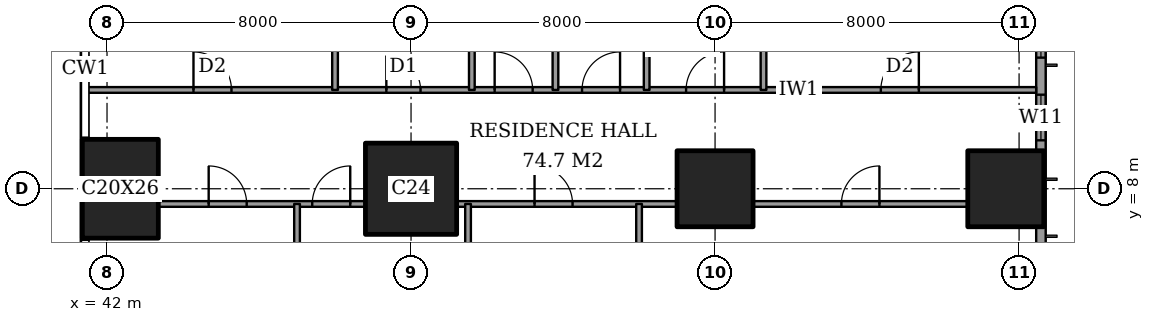
"""IFC4 building model, lengths in metres.
Left out: names, types, materials, properties, quantities, classifications, styles, units other than length and angle.
Written with IfcOpenShell. Run it as: python <this file> out.ifc"""

import sys

from ifc_helpers import new_model, si_unit, direction, frame, frame_2d, origin, origin_2d, place, context, subcontext, project, spatial, rectangle, extrude, element, fill, save


model = new_model("IFC4")
c1 = context("Model", 3, precision=1e-05, world=origin(), true_north=direction((0.0, 1.0)))
c2 = subcontext(c1, "Body", "Model", "MODEL_VIEW")
j1 = project(units=[si_unit("LENGTHUNIT", "METRE"), si_unit("PLANEANGLEUNIT", "RADIAN")], contexts=[c1])
p1 = place(None, origin())
s1 = spatial("IfcSite", under=j1, at=p1, CompositionType="ELEMENT")
p2 = place(p1, origin())
s2 = spatial("IfcBuilding", under=s1, at=p2, CompositionType="ELEMENT")
p3 = place(p2, frame((0.0, 0.0, 114.2)))
s3 = spatial("IfcBuildingStorey", under=s2, at=p3, CompositionType="ELEMENT", Elevation=114.2)
p4 = place(p3, frame((42.35, 8.0, 0.0), z_axis=(0.0, 0.0, 1.0), x_axis=(1.0, 0.0, 0.0)))
e1 = element("IfcColumn", 1, at=p4, inside=s3, PredefinedType="COLUMN", context=c2, shape_type="SweptSolid", body=[
    extrude(rectangle(XDim=2.0, YDim=2.6, at=origin_2d()), origin(), (0.0, 0.0, 1.0), 3.6),
])
p5 = place(p3, frame((50.0, 8.0, 0.0), z_axis=(0.0, 0.0, 1.0), x_axis=(1.0, 0.0, 0.0)))
e2 = element("IfcColumn", 2, at=p5, inside=s3, PredefinedType="COLUMN", context=c2, shape_type="SweptSolid", body=[
    extrude(rectangle(XDim=2.4, YDim=2.4, at=origin_2d()), origin(), (0.0, 0.0, 1.0), 3.6),
])
for number, where, z_axis, x_axis in (
    (3, (58.0, 8.0, 0.0), (0.0, 0.0, 1.0), (1.0, 0.0, 0.0)),
    (4, (65.65, 8.0, 0.0), (0.0, 0.0, 1.0), (1.0, 0.0, 0.0)),
):
    element("IfcColumn", number, at=place(p3, frame(where, z_axis=z_axis, x_axis=x_axis)), inside=s3, PredefinedType="COLUMN", context=c2, shape_type="SweptSolid", body=[
        extrude(rectangle(XDim=2.0, YDim=2.0, at=origin_2d()), origin(), (0.0, 0.0, 1.0), 3.6),
    ])
p6 = place(p3, frame((66.575, 3.175, 0.0), z_axis=(0.0, 0.0, 1.0), x_axis=(0.0, 1.0, 0.0)))
e5 = element("IfcWall", 5, at=p6, inside=s3, PredefinedType="SOLIDWALL", context=c2, shape_type="SweptSolid", body=[
    extrude(rectangle(XDim=41.65, YDim=0.25, at=frame_2d((20.825, 0.0))), origin(), (0.0, 0.0, 1.0), 3.6),
])
p7 = place(p6, frame((0.775, 0.0, 0.4)))
e6 = element("IfcOpeningElement", 6, at=p7, cuts=e5, PredefinedType="OPENING", context=c2, shape_type="SweptSolid", body=[
    extrude(rectangle(XDim=2.4, YDim=2.2, at=frame_2d((1.2, 1.1))), frame((0.0, 0.135, 0.0), z_axis=(0.0, -1.0, 0.0), x_axis=(1.0, 0.0, 0.0)), (0.0, 0.0, 1.0), 0.27),
])
p8 = place(p6, frame((6.1, 0.0, 0.4)))
e7 = element("IfcOpeningElement", 7, at=p8, cuts=e5, PredefinedType="OPENING", context=c2, shape_type="SweptSolid", body=[
    extrude(rectangle(XDim=1.2, YDim=2.2, at=frame_2d((0.6, 1.1))), frame((0.0, 0.135, 0.0), z_axis=(0.0, -1.0, 0.0), x_axis=(1.0, 0.0, 0.0)), (0.0, 0.0, 1.0), 0.27),
])
p9 = place(p6, frame((8.275, 0.0, 0.4)))
e8 = element("IfcOpeningElement", 8, at=p9, cuts=e5, PredefinedType="OPENING", context=c2, shape_type="SweptSolid", body=[
    extrude(rectangle(XDim=2.4, YDim=2.2, at=frame_2d((1.2, 1.1))), frame((0.0, 0.135, 0.0), z_axis=(0.0, -1.0, 0.0), x_axis=(1.0, 0.0, 0.0)), (0.0, 0.0, 1.0), 0.27),
])
p10 = place(p6, frame((15.775, 0.0, 0.4)))
e9 = element("IfcOpeningElement", 9, at=p10, cuts=e5, PredefinedType="OPENING", context=c2, shape_type="SweptSolid", body=[
    extrude(rectangle(XDim=2.4, YDim=2.2, at=frame_2d((1.2, 1.1))), frame((0.0, 0.135, 0.0), z_axis=(0.0, -1.0, 0.0), x_axis=(1.0, 0.0, 0.0)), (0.0, 0.0, 1.0), 0.27),
])
p11 = place(p6, frame((23.475, 0.0, 0.4)))
e10 = element("IfcOpeningElement", 10, at=p11, cuts=e5, PredefinedType="OPENING", context=c2, shape_type="SweptSolid", body=[
    extrude(rectangle(XDim=2.4, YDim=2.2, at=frame_2d((1.2, 1.1))), frame((0.0, 0.135, 0.0), z_axis=(0.0, -1.0, 0.0), x_axis=(1.0, 0.0, 0.0)), (0.0, 0.0, 1.0), 0.27),
])
p12 = place(p6, frame((30.975, 0.0, 0.4)))
e11 = element("IfcOpeningElement", 11, at=p12, cuts=e5, PredefinedType="OPENING", context=c2, shape_type="SweptSolid", body=[
    extrude(rectangle(XDim=2.4, YDim=2.2, at=frame_2d((1.2, 1.1))), frame((0.0, 0.135, 0.0), z_axis=(0.0, -1.0, 0.0), x_axis=(1.0, 0.0, 0.0)), (0.0, 0.0, 1.0), 0.27),
])
p13 = place(p6, frame((34.5, 0.0, 0.4)))
e12 = element("IfcOpeningElement", 12, at=p13, cuts=e5, PredefinedType="OPENING", context=c2, shape_type="SweptSolid", body=[
    extrude(rectangle(XDim=1.2, YDim=2.2, at=frame_2d((0.6, 1.1))), frame((0.0, 0.135, 0.0), z_axis=(0.0, -1.0, 0.0), x_axis=(1.0, 0.0, 0.0)), (0.0, 0.0, 1.0), 0.27),
])
p14 = place(p6, frame((38.475, 0.0, 0.4)))
e13 = element("IfcOpeningElement", 13, at=p14, cuts=e5, PredefinedType="OPENING", context=c2, shape_type="SweptSolid", body=[
    extrude(rectangle(XDim=2.4, YDim=2.2, at=frame_2d((1.2, 1.1))), frame((0.0, 0.135, 0.0), z_axis=(0.0, -1.0, 0.0), x_axis=(1.0, 0.0, 0.0)), (0.0, 0.0, 1.0), 0.27),
])
p15 = place(p3, frame((43.35, 7.6, 0.0), z_axis=(0.0, 0.0, 1.0), x_axis=(1.0, 0.0, 0.0)))
e14 = element("IfcWall", 14, at=p15, inside=s3, PredefinedType="PARTITIONING", context=c2, shape_type="SweptSolid", body=[
    extrude(rectangle(XDim=5.45, YDim=0.15, at=frame_2d((2.725, 0.0))), origin(), (0.0, 0.0, 1.0), 3.35),
])
p16 = place(p15, frame((4.05, 0.0, 0.0)))
e15 = element("IfcOpeningElement", 15, at=p16, cuts=e14, PredefinedType="OPENING", context=c2, shape_type="SweptSolid", body=[
    extrude(rectangle(XDim=1.0, YDim=2.1, at=frame_2d((0.5, 1.05))), frame((0.0, 0.085, 0.0), z_axis=(0.0, -1.0, 0.0), x_axis=(1.0, 0.0, 0.0)), (0.0, 0.0, 1.0), 0.17),
])
p17 = place(p15, frame((1.325, 0.0, 0.0)))
e16 = element("IfcOpeningElement", 16, at=p17, cuts=e14, PredefinedType="OPENING", context=c2, shape_type="SweptSolid", body=[
    extrude(rectangle(XDim=1.0, YDim=2.1, at=frame_2d((0.5, 1.05))), frame((0.0, 0.085, 0.0), z_axis=(0.0, -1.0, 0.0), x_axis=(1.0, 0.0, 0.0)), (0.0, 0.0, 1.0), 0.17),
])
p18 = place(p3, frame((51.2, 7.6, 0.0), z_axis=(0.0, 0.0, 1.0), x_axis=(1.0, 0.0, 0.0)))
e17 = element("IfcWall", 17, at=p18, inside=s3, PredefinedType="PARTITIONING", context=c2, shape_type="SweptSolid", body=[
    extrude(rectangle(XDim=5.8, YDim=0.15, at=frame_2d((2.9, 0.0))), origin(), (0.0, 0.0, 1.0), 3.35),
])
p19 = place(p18, frame((2.05, 0.0, 0.0)))
e18 = element("IfcOpeningElement", 18, at=p19, cuts=e17, PredefinedType="OPENING", context=c2, shape_type="SweptSolid", body=[
    extrude(rectangle(XDim=1.0, YDim=2.1, at=frame_2d((0.5, 1.05))), frame((0.0, 0.085, 0.0), z_axis=(0.0, -1.0, 0.0), x_axis=(1.0, 0.0, 0.0)), (0.0, 0.0, 1.0), 0.17),
])
p20 = place(p3, frame((59.0, 7.6, 0.0), z_axis=(0.0, 0.0, 1.0), x_axis=(1.0, 0.0, 0.0)))
e19 = element("IfcWall", 19, at=p20, inside=s3, PredefinedType="PARTITIONING", context=c2, shape_type="SweptSolid", body=[
    extrude(rectangle(XDim=5.65, YDim=0.15, at=frame_2d((2.825, 0.0))), origin(), (0.0, 0.0, 1.0), 3.35),
])
p21 = place(p20, frame((2.325, 0.0, 0.0)))
e20 = element("IfcOpeningElement", 20, at=p21, cuts=e19, PredefinedType="OPENING", context=c2, shape_type="SweptSolid", body=[
    extrude(rectangle(XDim=1.0, YDim=2.1, at=frame_2d((0.5, 1.05))), frame((0.0, 0.085, 0.0), z_axis=(0.0, -1.0, 0.0), x_axis=(1.0, 0.0, 0.0)), (0.0, 0.0, 1.0), 0.17),
])
p22 = place(p3, frame((41.439, 10.6, 0.0), z_axis=(0.0, 0.0, 1.0), x_axis=(1.0, 0.0, 0.0)))
e21 = element("IfcWall", 21, at=p22, inside=s3, PredefinedType="PARTITIONING", context=c2, shape_type="SweptSolid", body=[
    extrude(rectangle(XDim=25.011, YDim=0.15, at=frame_2d((12.505, 0.0))), origin(), (0.0, 0.0, 1.0), 3.35),
])
p23 = place(p22, frame((10.761, 0.0, 0.0)))
e22 = element("IfcOpeningElement", 22, at=p23, cuts=e21, PredefinedType="OPENING", context=c2, shape_type="SweptSolid", body=[
    extrude(rectangle(XDim=1.0, YDim=2.1, at=frame_2d((0.5, 1.05))), frame((0.0, 0.085, 0.0), z_axis=(0.0, -1.0, 0.0), x_axis=(1.0, 0.0, 0.0)), (0.0, 0.0, 1.0), 0.17),
])
p24 = place(p22, frame((20.924, 0.0, 0.0)))
e23 = element("IfcOpeningElement", 23, at=p24, cuts=e21, PredefinedType="OPENING", context=c2, shape_type="SweptSolid", body=[
    extrude(rectangle(XDim=1.0, YDim=2.1, at=frame_2d((0.5, 1.05))), frame((0.0, 0.085, 0.0), z_axis=(0.0, -1.0, 0.0), x_axis=(1.0, 0.0, 0.0)), (0.0, 0.0, 1.0), 0.17),
])
p25 = place(p22, frame((15.799, 0.0, 0.0)))
e24 = element("IfcOpeningElement", 24, at=p25, cuts=e21, PredefinedType="OPENING", context=c2, shape_type="SweptSolid", body=[
    extrude(rectangle(XDim=1.0, YDim=2.1, at=frame_2d((0.5, 1.05))), frame((0.0, 0.085, 0.0), z_axis=(0.0, -1.0, 0.0), x_axis=(1.0, 0.0, 0.0)), (0.0, 0.0, 1.0), 0.17),
])
p26 = place(p22, frame((13.061, 0.0, 0.0)))
e25 = element("IfcOpeningElement", 25, at=p26, cuts=e21, PredefinedType="OPENING", context=c2, shape_type="SweptSolid", body=[
    extrude(rectangle(XDim=1.0, YDim=2.1, at=frame_2d((0.5, 1.05))), frame((0.0, 0.085, 0.0), z_axis=(0.0, -1.0, 0.0), x_axis=(1.0, 0.0, 0.0)), (0.0, 0.0, 1.0), 0.17),
])
p27 = place(p22, frame((7.911, 0.0, 0.0)))
e26 = element("IfcOpeningElement", 26, at=p27, cuts=e21, PredefinedType="OPENING", context=c2, shape_type="SweptSolid", body=[
    extrude(rectangle(XDim=0.9, YDim=2.1, at=frame_2d((0.45, 1.05))), frame((0.0, 0.085, 0.0), z_axis=(0.0, -1.0, 0.0), x_axis=(1.0, 0.0, 0.0)), (0.0, 0.0, 1.0), 0.17),
])
p28 = place(p22, frame((2.836, 0.0, 0.0)))
e27 = element("IfcOpeningElement", 27, at=p28, cuts=e21, PredefinedType="OPENING", context=c2, shape_type="SweptSolid", body=[
    extrude(rectangle(XDim=1.0, YDim=2.1, at=frame_2d((0.5, 1.05))), frame((0.0, 0.085, 0.0), z_axis=(0.0, -1.0, 0.0), x_axis=(1.0, 0.0, 0.0)), (0.0, 0.0, 1.0), 0.17),
])
p29 = place(p3, frame((47.0, -0.45, 0.0), z_axis=(0.0, 0.0, 1.0), x_axis=(0.0, 1.0, 0.0)))
e28 = element("IfcWall", 28, at=p29, inside=s3, PredefinedType="PARTITIONING", context=c2, shape_type="SweptSolid", body=[
    extrude(rectangle(XDim=8.05, YDim=0.15, at=frame_2d((4.025, 0.0))), origin(), (0.0, 0.0, 1.0), 3.35),
])
p30 = place(p3, frame((48.0, 10.6, 0.0), z_axis=(0.0, 0.0, 1.0), x_axis=(0.0, 1.0, 0.0)))
e29 = element("IfcWall", 29, at=p30, inside=s3, PredefinedType="PARTITIONING", context=c2, shape_type="SweptSolid", body=[
    extrude(rectangle(XDim=13.4, YDim=0.15, at=frame_2d((6.7, 0.0))), origin(), (0.0, 0.0, 1.0), 3.35),
])
p31 = place(p30, frame((10.8, 0.0, 0.0)))
e30 = element("IfcOpeningElement", 30, at=p31, cuts=e29, PredefinedType="OPENING", context=c2, shape_type="SweptSolid", body=[
    extrude(rectangle(XDim=1.2, YDim=2.4, at=frame_2d((0.6, 1.2))), frame((0.0, 0.085, 0.0), z_axis=(0.0, -1.0, 0.0), x_axis=(1.0, 0.0, 0.0)), (0.0, 0.0, 1.0), 0.17),
])
p32 = place(p30, frame((6.7, 0.0, 0.0)))
e31 = element("IfcOpeningElement", 31, at=p32, cuts=e29, PredefinedType="OPENING", context=c2, shape_type="SweptSolid", body=[
    extrude(rectangle(XDim=0.9, YDim=2.1, at=frame_2d((0.45, 1.05))), frame((0.0, 0.085, 0.0), z_axis=(0.0, -1.0, 0.0), x_axis=(1.0, 0.0, 0.0)), (0.0, 0.0, 1.0), 0.17),
])
p33 = place(p3, frame((51.5, -0.45, 0.0), z_axis=(0.0, 0.0, 1.0), x_axis=(0.0, 1.0, 0.0)))
e32 = element("IfcWall", 32, at=p33, inside=s3, PredefinedType="PARTITIONING", context=c2, shape_type="SweptSolid", body=[
    extrude(rectangle(XDim=8.05, YDim=0.15, at=frame_2d((4.025, 0.0))), origin(), (0.0, 0.0, 1.0), 3.35),
])
for number, where, z_axis, x_axis in (
    (33, (51.6, 10.6, 0.0), (0.0, 0.0, 1.0), (0.0, 1.0, 0.0)),
    (34, (53.8, 10.6, 0.0), (0.0, 0.0, 1.0), (0.0, 1.0, 0.0)),
):
    element("IfcWall", number, at=place(p3, frame(where, z_axis=z_axis, x_axis=x_axis)), inside=s3, PredefinedType="PARTITIONING", context=c2, shape_type="SweptSolid", body=[
        extrude(rectangle(XDim=4.0, YDim=0.15, at=frame_2d((2.0, 0.0))), origin(), (0.0, 0.0, 1.0), 3.35),
    ])
p34 = place(p3, frame((56.0, -0.45, 0.0), z_axis=(0.0, 0.0, 1.0), x_axis=(0.0, 1.0, 0.0)))
e35 = element("IfcWall", 35, at=p34, inside=s3, PredefinedType="PARTITIONING", context=c2, shape_type="SweptSolid", body=[
    extrude(rectangle(XDim=8.05, YDim=0.15, at=frame_2d((4.025, 0.0))), origin(), (0.0, 0.0, 1.0), 3.35),
])
p35 = place(p3, frame((56.2, 10.6, 0.0), z_axis=(0.0, 0.0, 1.0), x_axis=(0.0, 1.0, 0.0)))
e36 = element("IfcWall", 36, at=p35, inside=s3, PredefinedType="PARTITIONING", context=c2, shape_type="SweptSolid", body=[
    extrude(rectangle(XDim=11.0, YDim=0.15, at=frame_2d((5.5, 0.0))), origin(), (0.0, 0.0, 1.0), 3.35),
])
p36 = place(p35, frame((7.0, 0.0, 0.0)))
e37 = element("IfcOpeningElement", 37, at=p36, cuts=e36, PredefinedType="OPENING", context=c2, shape_type="SweptSolid", body=[
    extrude(rectangle(XDim=1.0, YDim=2.1, at=frame_2d((0.5, 1.05))), frame((0.0, 0.085, 0.0), z_axis=(0.0, -1.0, 0.0), x_axis=(1.0, 0.0, 0.0)), (0.0, 0.0, 1.0), 0.17),
])
p37 = place(p3, frame((59.275, 10.6, 0.0), z_axis=(0.0, 0.0, 1.0), x_axis=(0.0, 1.0, 0.0)))
e38 = element("IfcWall", 38, at=p37, inside=s3, PredefinedType="PARTITIONING", context=c2, shape_type="SweptSolid", body=[
    extrude(rectangle(XDim=4.2, YDim=0.15, at=frame_2d((2.1, 0.0))), origin(), (0.0, 0.0, 1.0), 3.35),
])
p38 = place(p8, origin())
e39 = element("IfcWindow", 39, at=p38, inside=s3, PartitioningType="SINGLE_PANEL", PredefinedType="WINDOW", context=c2, shape_type="SweptSolid", body=[
    extrude(rectangle(XDim=1.2, YDim=2.2, at=frame_2d((0.6, 1.1))), frame((0.0, 0.03, 0.0), z_axis=(0.0, -1.0, 0.0), x_axis=(1.0, 0.0, 0.0)), (0.0, 0.0, 1.0), 0.06),
])
fill(e7, e39)
p39 = place(p9, origin())
e40 = element("IfcWindow", 40, at=p39, inside=s3, PartitioningType="SINGLE_PANEL", PredefinedType="WINDOW", context=c2, shape_type="SweptSolid", body=[
    extrude(rectangle(XDim=2.4, YDim=2.2, at=frame_2d((1.2, 1.1))), frame((0.0, 0.03, 0.0), z_axis=(0.0, -1.0, 0.0), x_axis=(1.0, 0.0, 0.0)), (0.0, 0.0, 1.0), 0.06),
])
fill(e8, e40)
p40 = place(p21, origin())
e41 = element("IfcDoor", 41, at=p40, inside=s3, OperationType="SINGLE_SWING_LEFT", PredefinedType="DOOR", context=c2, shape_type="SweptSolid", body=[
    extrude(rectangle(XDim=1.0, YDim=2.1, at=frame_2d((0.5, 1.05))), frame((0.0, 0.025, 0.0), z_axis=(0.0, -1.0, 0.0), x_axis=(1.0, 0.0, 0.0)), (0.0, 0.0, 1.0), 0.05),
])
fill(e20, e41)
p41 = place(p19, origin())
e42 = element("IfcDoor", 42, at=p41, inside=s3, OperationType="SINGLE_SWING_RIGHT", PredefinedType="DOOR", context=c2, shape_type="SweptSolid", body=[
    extrude(rectangle(XDim=1.0, YDim=2.1, at=frame_2d((0.5, 1.05))), frame((0.0, 0.025, 0.0), z_axis=(0.0, -1.0, 0.0), x_axis=(1.0, 0.0, 0.0)), (0.0, 0.0, 1.0), 0.05),
])
fill(e18, e42)
p42 = place(p16, origin())
e43 = element("IfcDoor", 43, at=p42, inside=s3, OperationType="SINGLE_SWING_LEFT", PredefinedType="DOOR", context=c2, shape_type="SweptSolid", body=[
    extrude(rectangle(XDim=1.0, YDim=2.1, at=frame_2d((0.5, 1.05))), frame((0.0, 0.025, 0.0), z_axis=(0.0, -1.0, 0.0), x_axis=(1.0, 0.0, 0.0)), (0.0, 0.0, 1.0), 0.05),
])
fill(e15, e43)
p43 = place(p17, origin())
e44 = element("IfcDoor", 44, at=p43, inside=s3, OperationType="SINGLE_SWING_RIGHT", PredefinedType="DOOR", context=c2, shape_type="SweptSolid", body=[
    extrude(rectangle(XDim=1.0, YDim=2.1, at=frame_2d((0.5, 1.05))), frame((0.0, 0.025, 0.0), z_axis=(0.0, -1.0, 0.0), x_axis=(1.0, 0.0, 0.0)), (0.0, 0.0, 1.0), 0.05),
])
fill(e16, e44)
p44 = place(p23, origin())
e45 = element("IfcDoor", 45, at=p44, inside=s3, OperationType="SINGLE_SWING_RIGHT", PredefinedType="DOOR", context=c2, shape_type="SweptSolid", body=[
    extrude(rectangle(XDim=1.0, YDim=2.1, at=frame_2d((0.5, 1.05))), frame((0.0, 0.025, 0.0), z_axis=(0.0, -1.0, 0.0), x_axis=(1.0, 0.0, 0.0)), (0.0, 0.0, 1.0), 0.05),
])
fill(e22, e45)
p45 = place(p24, origin())
e46 = element("IfcDoor", 46, at=p45, inside=s3, OperationType="SINGLE_SWING_LEFT", PredefinedType="DOOR", context=c2, shape_type="SweptSolid", body=[
    extrude(rectangle(XDim=1.0, YDim=2.1, at=frame_2d((0.5, 1.05))), frame((0.0, 0.025, 0.0), z_axis=(0.0, -1.0, 0.0), x_axis=(1.0, 0.0, 0.0)), (0.0, 0.0, 1.0), 0.05),
])
fill(e23, e46)
p46 = place(p25, origin())
e47 = element("IfcDoor", 47, at=p46, inside=s3, OperationType="SINGLE_SWING_LEFT", PredefinedType="DOOR", context=c2, shape_type="SweptSolid", body=[
    extrude(rectangle(XDim=1.0, YDim=2.1, at=frame_2d((0.5, 1.05))), frame((0.0, 0.025, 0.0), z_axis=(0.0, -1.0, 0.0), x_axis=(1.0, 0.0, 0.0)), (0.0, 0.0, 1.0), 0.05),
])
fill(e24, e47)
p47 = place(p26, origin())
e48 = element("IfcDoor", 48, at=p47, inside=s3, OperationType="SINGLE_SWING_LEFT", PredefinedType="DOOR", context=c2, shape_type="SweptSolid", body=[
    extrude(rectangle(XDim=1.0, YDim=2.1, at=frame_2d((0.5, 1.05))), frame((0.0, 0.025, 0.0), z_axis=(0.0, -1.0, 0.0), x_axis=(1.0, 0.0, 0.0)), (0.0, 0.0, 1.0), 0.05),
])
fill(e25, e48)
p48 = place(p27, origin())
e49 = element("IfcDoor", 49, at=p48, inside=s3, OperationType="SINGLE_SWING_RIGHT", PredefinedType="DOOR", context=c2, shape_type="SweptSolid", body=[
    extrude(rectangle(XDim=0.9, YDim=2.1, at=frame_2d((0.45, 1.05))), frame((0.0, 0.025, 0.0), z_axis=(0.0, -1.0, 0.0), x_axis=(1.0, 0.0, 0.0)), (0.0, 0.0, 1.0), 0.05),
])
fill(e26, e49)
p49 = place(p28, origin())
e50 = element("IfcDoor", 50, at=p49, inside=s3, OperationType="SINGLE_SWING_RIGHT", PredefinedType="DOOR", context=c2, shape_type="SweptSolid", body=[
    extrude(rectangle(XDim=1.0, YDim=2.1, at=frame_2d((0.5, 1.05))), frame((0.0, 0.025, 0.0), z_axis=(0.0, -1.0, 0.0), x_axis=(1.0, 0.0, 0.0)), (0.0, 0.0, 1.0), 0.05),
])
fill(e27, e50)
save(model, sys.argv[1])
